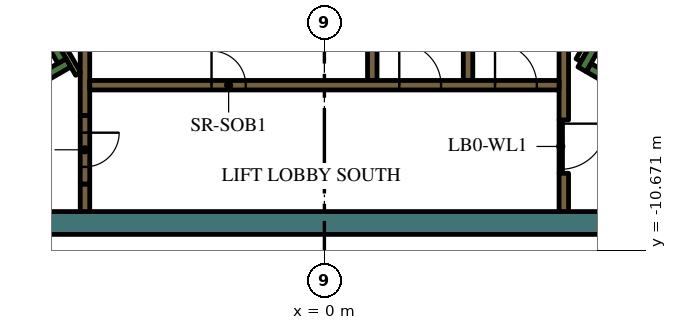
"""IFC4 building model, lengths in metres.
Left out: names, types, materials, properties, quantities, classifications, styles, units other than length and angle.
Written with IfcOpenShell. Run it as: python <this file> out.ifc"""

import sys

from ifc_helpers import new_model, si_unit, direction, frame, frame_2d, origin, place, context, subcontext, project, spatial, rectangle, extrude, element, fill, save


model = new_model("IFC4")
c1 = context("Model", 3, precision=1e-05, world=origin(), true_north=direction((0.0, 1.0)))
c2 = subcontext(c1, "Body", "Model", "MODEL_VIEW")
j1 = project(units=[si_unit("LENGTHUNIT", "METRE"), si_unit("PLANEANGLEUNIT", "RADIAN")], contexts=[c1])
p1 = place(None, origin())
s1 = spatial("IfcSite", under=j1, at=p1, CompositionType="ELEMENT")
p2 = place(p1, origin())
s2 = spatial("IfcBuilding", under=s1, at=p2, CompositionType="ELEMENT")
p3 = place(p2, frame((0.0, 0.0, 279.6)))
s3 = spatial("IfcBuildingStorey", under=s2, at=p3, CompositionType="ELEMENT", Elevation=279.6)
p4 = place(p3, frame((8.904, -9.95, 0.0), z_axis=(0.0, 0.0, 1.0), x_axis=(-1.0, 0.0, 0.0)))
e1 = element("IfcWall", 1, at=p4, inside=s3, PredefinedType="SOLIDWALL", context=c2, shape_type="SweptSolid", body=[
    extrude(rectangle(XDim=22.161, YDim=0.6, at=frame_2d((11.081, 0.0))), origin(), (0.0, 0.0, 1.0), 4.2),
])
p5 = place(p3, frame((12.84, -9.261, 0.0), z_axis=(0.0, 0.0, 1.0), x_axis=(-0.866013990052, 0.500019768644, 0.0)))
e2 = element("IfcWall", 2, at=p5, inside=s3, PredefinedType="SOLIDWALL", context=c2, shape_type="SweptSolid", body=[
    extrude(rectangle(XDim=6.8, YDim=0.25, at=frame_2d((3.4, 0.0))), origin(), (0.0, 0.0, 1.0), 4.2),
])
p6 = place(p3, frame((6.78, -5.906, 0.0), z_axis=(0.0, 0.0, 1.0), x_axis=(0.500223362819, 0.865896406789, 0.0)))
e3 = element("IfcWall", 3, at=p6, inside=s3, PredefinedType="SOLIDWALL", context=c2, shape_type="SweptSolid", body=[
    extrude(rectangle(XDim=0.675, YDim=0.25, at=frame_2d((0.337, 0.0))), origin(), (0.0, 0.0, 1.0), 4.2),
])
p7 = place(p3, frame((-12.84, -9.261, 0.0), z_axis=(0.0, 0.0, 1.0), x_axis=(0.866016039709, 0.500016218704, 0.0)))
e4 = element("IfcWall", 4, at=p7, inside=s3, PredefinedType="SOLIDWALL", context=c2, shape_type="SweptSolid", body=[
    extrude(rectangle(XDim=7.05, YDim=0.25, at=frame_2d((3.525, 0.0))), origin(), (0.0, 0.0, 1.0), 4.2),
])
p8 = place(p3, frame((-6.905, -5.69, 0.0), z_axis=(0.0, 0.0, 1.0), x_axis=(-0.500402024738, 0.865793170242, 0.0)))
e5 = element("IfcWall", 5, at=p8, inside=s3, PredefinedType="SOLIDWALL", context=c2, shape_type="SweptSolid", body=[
    extrude(rectangle(XDim=0.425, YDim=0.25, at=frame_2d((0.212, 0.0))), origin(), (0.0, 0.0, 1.0), 4.2),
])
p9 = place(p3, frame((6.3, -7.24, 0.0), z_axis=(0.0, 0.0, 1.0), x_axis=(0.0, 1.0, 0.0)))
e6 = element("IfcWall", 6, at=p9, inside=s3, PredefinedType="SOLIDWALL", context=c2, shape_type="SweptSolid", body=[
    extrude(rectangle(XDim=3.556, YDim=0.25, at=frame_2d((1.778, 0.0))), origin(), (0.0, 0.0, 1.0), 4.2),
])
p10 = place(p3, frame((6.3, -9.65, 0.0), z_axis=(0.0, 0.0, 1.0), x_axis=(0.0, 1.0, 0.0)))
e7 = element("IfcWall", 7, at=p10, inside=s3, PredefinedType="SOLIDWALL", context=c2, shape_type="SweptSolid", body=[
    extrude(rectangle(XDim=1.008, YDim=0.25, at=frame_2d((0.504, 0.0))), origin(), (0.0, 0.0, 1.0), 4.2),
])
for number, where, z_axis, x_axis in (
    (8, (1.26, -4.0, 0.0), (0.0, 0.0, 1.0), (0.0, -1.0, 0.0)),
    (9, (3.78, -4.0, 0.0), (0.0, 0.0, 1.0), (0.0, -1.0, 0.0)),
):
    element("IfcWall", number, at=place(p3, frame(where, z_axis=z_axis, x_axis=x_axis)), inside=s3, PredefinedType="SOLIDWALL", context=c2, shape_type="SweptSolid", body=[
        extrude(rectangle(XDim=2.2, YDim=0.25, at=frame_2d((1.1, 0.0))), origin(), (0.0, 0.0, 1.0), 4.2),
    ])
p11 = place(p3, frame((-6.3, -7.125, 0.0), z_axis=(0.0, 0.0, 1.0), x_axis=(0.0, 1.0, 0.0)))
e10 = element("IfcWall", 10, at=p11, inside=s3, PredefinedType="SOLIDWALL", context=c2, shape_type="SweptSolid", body=[
    extrude(rectangle(XDim=3.375, YDim=0.25, at=frame_2d((1.687, 0.0))), origin(), (0.0, 0.0, 1.0), 4.2),
])
p12 = place(p3, frame((-6.3, -8.925, 0.0), z_axis=(0.0, 0.0, 1.0), x_axis=(0.0, -1.0, 0.0)))
e11 = element("IfcWall", 11, at=p12, inside=s3, PredefinedType="SOLIDWALL", context=c2, shape_type="SweptSolid", body=[
    extrude(rectangle(XDim=0.725, YDim=0.25, at=frame_2d((0.363, 0.0))), origin(), (0.0, 0.0, 1.0), 4.2),
])
p13 = place(p3, frame((-6.48, -6.027, 0.0), z_axis=(0.0, 0.0, 1.0), x_axis=(-0.499927229454, 0.866067413802, 0.0)))
e12 = element("IfcWall", 12, at=p13, inside=s3, PredefinedType="PARTITIONING", context=c2, shape_type="SweptSolid", body=[
    extrude(rectangle(XDim=0.929, YDim=0.15, at=frame_2d((0.464, 0.0))), origin(), (0.0, 0.0, 1.0), 4.2),
])
p14 = place(p3, frame((6.945, -5.222, 0.0), z_axis=(0.0, 0.0, 1.0), x_axis=(-0.499818422106, -0.866130212453, 0.0)))
e13 = element("IfcWall", 13, at=p14, inside=s3, PredefinedType="PARTITIONING", context=c2, shape_type="SweptSolid", body=[
    extrude(rectangle(XDim=0.514, YDim=0.15, at=frame_2d((0.257, 0.0))), origin(), (0.0, 0.0, 1.0), 3.55),
])
p15 = place(p3, frame((-6.175, -6.325, 0.0), z_axis=(0.0, 0.0, 1.0), x_axis=(1.0, 0.0, 0.0)))
e14 = element("IfcWall", 14, at=p15, inside=s3, PredefinedType="SOLIDWALL", context=c2, shape_type="SweptSolid", body=[
    extrude(rectangle(XDim=12.35, YDim=0.25, at=frame_2d((6.175, 0.0))), origin(), (0.0, 0.0, 1.0), 4.2),
])
p16 = place(p15, frame((3.205, 0.0, 0.0)))
e15 = element("IfcOpeningElement", 15, at=p16, cuts=e14, PredefinedType="OPENING", context=c2, shape_type="SweptSolid", body=[
    extrude(rectangle(XDim=0.9, YDim=2.1, at=frame_2d((0.45, 1.05))), frame((0.0, 0.135, 0.0), z_axis=(0.0, -1.0, 0.0), x_axis=(1.0, 0.0, 0.0)), (0.0, 0.0, 1.0), 0.27),
])
p17 = place(p15, frame((8.145, 0.0, 0.0)))
e16 = element("IfcOpeningElement", 16, at=p17, cuts=e14, PredefinedType="OPENING", context=c2, shape_type="SweptSolid", body=[
    extrude(rectangle(XDim=1.1, YDim=2.1, at=frame_2d((0.55, 1.05))), frame((0.0, 0.135, 0.0), z_axis=(0.0, -1.0, 0.0), x_axis=(1.0, 0.0, 0.0)), (0.0, 0.0, 1.0), 0.27),
])
p18 = place(p15, frame((10.665, 0.0, 0.0)))
e17 = element("IfcOpeningElement", 17, at=p18, cuts=e14, PredefinedType="OPENING", context=c2, shape_type="SweptSolid", body=[
    extrude(rectangle(XDim=1.1, YDim=2.1, at=frame_2d((0.55, 1.05))), frame((0.0, 0.135, 0.0), z_axis=(0.0, -1.0, 0.0), x_axis=(1.0, 0.0, 0.0)), (0.0, 0.0, 1.0), 0.27),
])
p19 = place(p3, frame((-6.3, -7.125, 0.0), z_axis=(0.0, 0.0, 1.0), x_axis=(0.0, -1.0, 0.0)))
e18 = element("IfcWall", 18, at=p19, inside=s3, PredefinedType="SOLIDWALL", context=c2, shape_type="SweptSolid", body=[
    extrude(rectangle(XDim=1.8, YDim=0.25, at=frame_2d((0.9, 0.0))), origin(), (0.0, 0.0, 1.0), 4.2),
])
p20 = place(p19, frame((0.45, 0.0, 0.0)))
e19 = element("IfcOpeningElement", 19, at=p20, cuts=e18, PredefinedType="OPENING", context=c2, shape_type="SweptSolid", body=[
    extrude(rectangle(XDim=0.9, YDim=2.1, at=frame_2d((0.45, 1.05))), frame((0.0, 0.135, 0.0), z_axis=(0.0, -1.0, 0.0), x_axis=(1.0, 0.0, 0.0)), (0.0, 0.0, 1.0), 0.27),
])
p21 = place(p3, frame((6.22, -7.237, 0.0), z_axis=(0.0, 0.0, 1.0), x_axis=(0.0, -1.0, 0.0)))
e20 = element("IfcWall", 20, at=p21, inside=s3, PredefinedType="PARTITIONING", context=c2, shape_type="SweptSolid", body=[
    extrude(rectangle(XDim=1.4, YDim=0.09, at=frame_2d((0.7, 0.0))), origin(), (0.0, 0.0, 1.0), 3.55),
])
p22 = place(p21, frame((0.1, 0.0, 0.0)))
e21 = element("IfcOpeningElement", 21, at=p22, cuts=e20, PredefinedType="OPENING", context=c2, shape_type="SweptSolid", body=[
    extrude(rectangle(XDim=1.2, YDim=2.1, at=frame_2d((0.6, 1.05))), frame((0.0, 0.055, 0.0), z_axis=(0.0, -1.0, 0.0), x_axis=(1.0, 0.0, 0.0)), (0.0, 0.0, 1.0), 0.11),
])
p23 = place(p16, origin())
e22 = element("IfcDoor", 22, at=p23, inside=s3, OperationType="SINGLE_SWING_LEFT", PredefinedType="DOOR", context=c2, shape_type="SweptSolid", body=[
    extrude(rectangle(XDim=0.9, YDim=2.1, at=frame_2d((0.45, 1.05))), frame((0.0, 0.025, 0.0), z_axis=(0.0, -1.0, 0.0), x_axis=(1.0, 0.0, 0.0)), (0.0, 0.0, 1.0), 0.05),
])
fill(e15, e22)
p24 = place(p17, origin())
e23 = element("IfcDoor", 23, at=p24, inside=s3, OperationType="DOUBLE_DOOR_SLIDING", PredefinedType="DOOR", context=c2, shape_type="SweptSolid", body=[
    extrude(rectangle(XDim=1.1, YDim=2.1, at=frame_2d((0.55, 1.05))), frame((0.0, 0.025, 0.0), z_axis=(0.0, -1.0, 0.0), x_axis=(1.0, 0.0, 0.0)), (0.0, 0.0, 1.0), 0.05),
])
fill(e16, e23)
p25 = place(p18, origin())
e24 = element("IfcDoor", 24, at=p25, inside=s3, OperationType="DOUBLE_DOOR_SLIDING", PredefinedType="DOOR", context=c2, shape_type="SweptSolid", body=[
    extrude(rectangle(XDim=1.1, YDim=2.1, at=frame_2d((0.55, 1.05))), frame((0.0, 0.025, 0.0), z_axis=(0.0, -1.0, 0.0), x_axis=(1.0, 0.0, 0.0)), (0.0, 0.0, 1.0), 0.05),
])
fill(e17, e24)
p26 = place(p20, origin())
e25 = element("IfcDoor", 25, at=p26, inside=s3, OperationType="SINGLE_SWING_LEFT", PredefinedType="DOOR", context=c2, shape_type="SweptSolid", body=[
    extrude(rectangle(XDim=0.9, YDim=2.1, at=frame_2d((0.45, 1.05))), frame((0.0, 0.025, 0.0), z_axis=(0.0, -1.0, 0.0), x_axis=(1.0, 0.0, 0.0)), (0.0, 0.0, 1.0), 0.05),
])
fill(e19, e25)
p27 = place(p22, origin())
e26 = element("IfcDoor", 26, at=p27, inside=s3, OperationType="SINGLE_SWING_LEFT", PredefinedType="DOOR", context=c2, shape_type="SweptSolid", body=[
    extrude(rectangle(XDim=1.2, YDim=2.1, at=frame_2d((0.6, 1.05))), frame((0.0, 0.025, 0.0), z_axis=(0.0, -1.0, 0.0), x_axis=(1.0, 0.0, 0.0)), (0.0, 0.0, 1.0), 0.05),
])
fill(e21, e26)
save(model, sys.argv[1])
